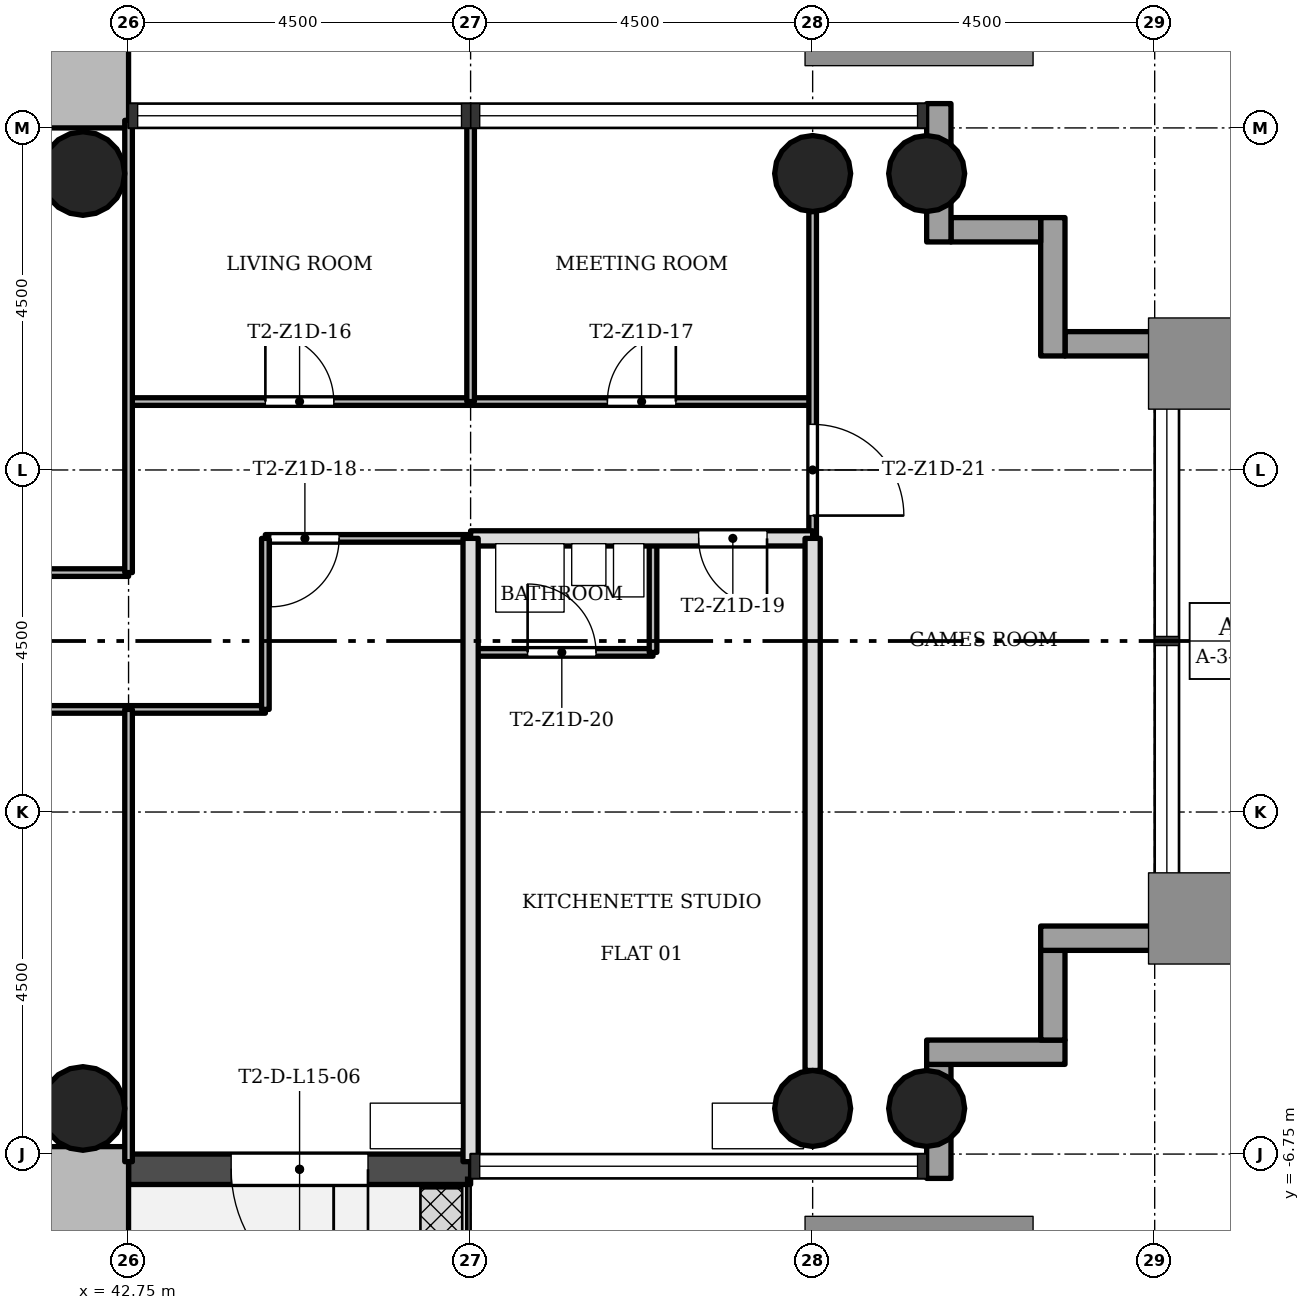
"""IFC4 building model, lengths in metres.
Left out: names, types, materials, properties, quantities, classifications, styles, units other than length and angle.
Written with IfcOpenShell. Run it as: python <this file> out.ifc"""

import sys

from ifc_helpers import new_model, si_unit, direction, frame, frame_2d, origin, origin_2d, place, context, subcontext, project, spatial, rectangle, hollow_circle, extrude, element, fill, save


model = new_model("IFC4")
c1 = context("Model", 3, precision=1e-05, world=origin(), true_north=direction((0.0, 1.0)))
c2 = subcontext(c1, "Body", "Model", "MODEL_VIEW")
j1 = project(units=[si_unit("LENGTHUNIT", "METRE"), si_unit("PLANEANGLEUNIT", "RADIAN")], contexts=[c1])
p1 = place(None, origin())
s1 = spatial("IfcSite", under=j1, at=p1, CompositionType="ELEMENT")
p2 = place(p1, origin())
s2 = spatial("IfcBuilding", under=s1, at=p2, CompositionType="ELEMENT")
p3 = place(p2, frame((0.0, 0.0, 58.5)))
s3 = spatial("IfcBuildingStorey", under=s2, at=p3, CompositionType="ELEMENT", Elevation=58.5)
p4 = place(p3, frame((30.35, 7.3, 0.0), z_axis=(0.0, 0.0, 1.0), x_axis=(1.0, 0.0, 0.0)))
e1 = element("IfcWall", 1, at=p4, inside=s3, PredefinedType="SHEAR", context=c2, shape_type="SweptSolid", body=[
    extrude(rectangle(XDim=12.4, YDim=1.1, at=frame_2d((6.2, 0.0))), origin(), (0.0, 0.0, 1.0), 3.4),
])
p5 = place(p4, frame((4.75, 0.0, 0.0)))
e2 = element("IfcOpeningElement", 2, at=p5, cuts=e1, PredefinedType="OPENING", context=c2, shape_type="SweptSolid", body=[
    extrude(rectangle(XDim=1.8, YDim=2.1, at=frame_2d((0.9, 1.05))), frame((0.0, 0.56, 0.0), z_axis=(0.0, -1.0, 0.0), x_axis=(1.0, 0.0, 0.0)), (0.0, 0.0, 1.0), 1.12),
])
p6 = place(p3, frame((42.2, -15.248, 0.0), z_axis=(0.0, 0.0, 1.0), x_axis=(0.0, 1.0, 0.0)))
e3 = element("IfcWall", 3, at=p6, inside=s3, PredefinedType="SHEAR", context=c2, shape_type="SweptSolid", body=[
    extrude(rectangle(XDim=8.596, YDim=1.1, at=frame_2d((4.298, 0.0))), origin(), (0.0, 0.0, 1.0), 3.4),
])
for number, where, z_axis, x_axis in (
    (4, (51.75, -6.15, 0.0), (0.0, 0.0, 1.0), (1.0, 0.0, 0.0)),
    (5, (51.75, 6.15, 0.0), (0.0, 0.0, 1.0), (1.0, 0.0, 0.0)),
    (6, (53.25, -6.15, 0.0), (0.0, 0.0, 1.0), (1.0, 0.0, 0.0)),
    (7, (53.25, 6.15, 0.0), (0.0, 0.0, 1.0), (1.0, 0.0, 0.0)),
):
    element("IfcColumn", number, at=place(p3, frame(where, z_axis=z_axis, x_axis=x_axis)), inside=s3, PredefinedType="COLUMN", context=c2, shape_type="SweptSolid", body=[
        extrude(hollow_circle(Radius=0.5, WallThickness=0.036, at=origin_2d()), origin(), (0.0, 0.0, 1.0), 3.4),
    ])
for number, where, z_axis, x_axis in (
    (8, (42.15, -6.15, 0.0), (0.0, 0.0, 1.0), (1.0, 0.0, 0.0)),
    (9, (42.15, 6.15, 0.0), (0.0, 0.0, 1.0), (1.0, 0.0, 0.0)),
):
    element("IfcColumn", number, at=place(p3, frame(where, z_axis=z_axis, x_axis=x_axis)), inside=s3, PredefinedType="COLUMN", context=c2, shape_type="SweptSolid", body=[
        extrude(hollow_circle(Radius=0.55, WallThickness=0.04, at=origin_2d()), origin(), (0.0, 0.0, 1.0), 3.4),
    ])
p7 = place(p3, frame((42.75, -6.95, -0.02), z_axis=(0.0, 0.0, 1.0), x_axis=(1.0, 0.0, 0.0)))
e10 = element("IfcWall", 10, at=p7, inside=s3, PredefinedType="STANDARD", context=c2, shape_type="SweptSolid", body=[
    extrude(rectangle(XDim=4.5, YDim=0.4, at=frame_2d((2.25, 0.0))), origin(), (0.0, 0.0, 1.0), 3.12),
])
p8 = place(p7, frame((1.35, 0.0, 0.02)))
e11 = element("IfcOpeningElement", 11, at=p8, cuts=e10, PredefinedType="OPENING", context=c2, shape_type="SweptSolid", body=[
    extrude(rectangle(XDim=1.8, YDim=2.1, at=frame_2d((0.9, 1.05))), frame((0.0, 0.21, 0.0), z_axis=(0.0, -1.0, 0.0), x_axis=(1.0, 0.0, 0.0)), (0.0, 0.0, 1.0), 0.42),
])
p9 = place(p3, frame((53.41, -7.07, -0.3), z_axis=(0.0, 0.0, 1.0), x_axis=(0.0, 1.0, 0.0)))
e12 = element("IfcWall", 12, at=p9, inside=s3, PredefinedType="STANDARD", context=c2, shape_type="SweptSolid", body=[
    extrude(rectangle(XDim=1.5, YDim=0.32, at=frame_2d((0.75, 0.0))), origin(), (0.0, 0.0, 1.0), 3.4),
])
p10 = place(p3, frame((53.25, -5.41, -0.3), z_axis=(0.0, 0.0, 1.0), x_axis=(1.0, 0.0, 0.0)))
e13 = element("IfcWall", 13, at=p10, inside=s3, PredefinedType="STANDARD", context=c2, shape_type="SweptSolid", body=[
    extrude(rectangle(XDim=1.82, YDim=0.32, at=frame_2d((0.91, 0.0))), origin(), (0.0, 0.0, 1.0), 3.4),
])
p11 = place(p3, frame((54.91, -5.25, -0.3), z_axis=(0.0, 0.0, 1.0), x_axis=(0.0, 1.0, 0.0)))
e14 = element("IfcWall", 14, at=p11, inside=s3, PredefinedType="STANDARD", context=c2, shape_type="SweptSolid", body=[
    extrude(rectangle(XDim=1.18, YDim=0.32, at=frame_2d((0.59, 0.0))), origin(), (0.0, 0.0, 1.0), 3.4),
])
p12 = place(p3, frame((54.75, -3.91, -0.3), z_axis=(0.0, 0.0, 1.0), x_axis=(1.0, 0.0, 0.0)))
e15 = element("IfcWall", 15, at=p12, inside=s3, PredefinedType="STANDARD", context=c2, shape_type="SweptSolid", body=[
    extrude(rectangle(XDim=1.82, YDim=0.32, at=frame_2d((0.91, 0.0))), origin(), (0.0, 0.0, 1.0), 3.4),
])
p13 = place(p3, frame((56.57, 3.91, -0.3), z_axis=(0.0, 0.0, 1.0), x_axis=(-1.0, 0.0, 0.0)))
e16 = element("IfcWall", 16, at=p13, inside=s3, PredefinedType="STANDARD", context=c2, shape_type="SweptSolid", body=[
    extrude(rectangle(XDim=1.5, YDim=0.32, at=frame_2d((0.75, 0.0))), origin(), (0.0, 0.0, 1.0), 3.4),
])
p14 = place(p3, frame((54.91, 3.75, -0.3), z_axis=(0.0, 0.0, 1.0), x_axis=(0.0, 1.0, 0.0)))
e17 = element("IfcWall", 17, at=p14, inside=s3, PredefinedType="STANDARD", context=c2, shape_type="SweptSolid", body=[
    extrude(rectangle(XDim=1.82, YDim=0.32, at=frame_2d((0.91, 0.0))), origin(), (0.0, 0.0, 1.0), 3.4),
])
p15 = place(p3, frame((54.75, 5.41, -0.3), z_axis=(0.0, 0.0, 1.0), x_axis=(-1.0, 0.0, 0.0)))
e18 = element("IfcWall", 18, at=p15, inside=s3, PredefinedType="STANDARD", context=c2, shape_type="SweptSolid", body=[
    extrude(rectangle(XDim=1.18, YDim=0.32, at=frame_2d((0.59, 0.0))), origin(), (0.0, 0.0, 1.0), 3.4),
])
p16 = place(p3, frame((53.41, 5.25, -0.3), z_axis=(0.0, 0.0, 1.0), x_axis=(0.0, 1.0, 0.0)))
e19 = element("IfcWall", 19, at=p16, inside=s3, PredefinedType="STANDARD", context=c2, shape_type="SweptSolid", body=[
    extrude(rectangle(XDim=1.82, YDim=0.32, at=frame_2d((0.91, 0.0))), origin(), (0.0, 0.0, 1.0), 3.4),
])
p17 = place(p3, frame((44.55, -0.9, 0.0), z_axis=(0.0, 0.0, 1.0), x_axis=(-1.0, 0.0, 0.0)))
e20 = element("IfcWall", 20, at=p17, inside=s3, PredefinedType="PARTITIONING", context=c2, shape_type="SweptSolid", body=[
    extrude(rectangle(XDim=7.05, YDim=0.1, at=frame_2d((3.525, 0.0))), origin(), (0.0, 0.0, 1.0), 3.0),
])
p18 = place(p17, frame((5.4, 0.0, 0.0)))
e21 = element("IfcOpeningElement", 21, at=p18, cuts=e20, PredefinedType="OPENING", context=c2, shape_type="SweptSolid", body=[
    extrude(rectangle(XDim=0.9, YDim=2.1, at=frame_2d((0.45, 1.05))), frame((0.0, 0.06, 0.0), z_axis=(0.0, -1.0, 0.0), x_axis=(1.0, 0.0, 0.0)), (0.0, 0.0, 1.0), 0.12),
])
p19 = place(p3, frame((49.65, -0.15, 0.0), z_axis=(0.0, 0.0, 1.0), x_axis=(-1.0, 0.0, 0.0)))
e22 = element("IfcWall", 22, at=p19, inside=s3, PredefinedType="PARTITIONING", context=c2, shape_type="SweptSolid", body=[
    extrude(rectangle(XDim=2.4, YDim=0.1, at=frame_2d((1.2, 0.0))), origin(), (0.0, 0.0, 1.0), 3.0),
])
p20 = place(p19, frame((0.75, 0.0, 0.0)))
e23 = element("IfcOpeningElement", 23, at=p20, cuts=e22, PredefinedType="OPENING", context=c2, shape_type="SweptSolid", body=[
    extrude(rectangle(XDim=0.9, YDim=2.1, at=frame_2d((0.45, 1.05))), frame((0.0, 0.06, 0.0), z_axis=(0.0, -1.0, 0.0), x_axis=(1.0, 0.0, 0.0)), (0.0, 0.0, 1.0), 0.12),
])
p21 = place(p3, frame((42.75, 0.9, 0.0), z_axis=(0.0, 0.0, 1.0), x_axis=(-1.0, 0.0, 0.0)))
e24 = element("IfcWall", 24, at=p21, inside=s3, PredefinedType="PARTITIONING", context=c2, shape_type="SweptSolid", body=[
    extrude(rectangle(XDim=5.25, YDim=0.1, at=frame_2d((2.625, 0.0))), origin(), (0.0, 0.0, 1.0), 3.0),
])
p22 = place(p3, frame((47.25, 1.35, 0.0), z_axis=(0.0, 0.0, 1.0), x_axis=(-1.0, 0.0, 0.0)))
e25 = element("IfcWall", 25, at=p22, inside=s3, PredefinedType="PARTITIONING", context=c2, shape_type="SweptSolid", body=[
    extrude(rectangle(XDim=2.7, YDim=0.1, at=frame_2d((1.35, 0.0))), origin(), (0.0, 0.0, 1.0), 3.0),
])
p23 = place(p22, frame((1.73, 0.0, 0.0)))
e26 = element("IfcOpeningElement", 26, at=p23, cuts=e25, PredefinedType="OPENING", context=c2, shape_type="SweptSolid", body=[
    extrude(rectangle(XDim=0.9, YDim=2.1, at=frame_2d((0.45, 1.05))), frame((0.0, 0.06, 0.0), z_axis=(0.0, -1.0, 0.0), x_axis=(1.0, 0.0, 0.0)), (0.0, 0.0, 1.0), 0.12),
])
p24 = place(p3, frame((51.75, 1.35, 0.0), z_axis=(0.0, 0.0, 1.0), x_axis=(-1.0, 0.0, 0.0)))
e27 = element("IfcWall", 27, at=p24, inside=s3, PredefinedType="SOLIDWALL", context=c2, shape_type="SweptSolid", body=[
    extrude(rectangle(XDim=4.5, YDim=0.2, at=frame_2d((2.25, 0.0))), origin(), (0.0, 0.0, 1.0), 3.0),
])
p25 = place(p24, frame((0.6, 0.0, 0.0)))
e28 = element("IfcOpeningElement", 28, at=p25, cuts=e27, PredefinedType="OPENING", context=c2, shape_type="SweptSolid", body=[
    extrude(rectangle(XDim=0.9, YDim=2.1, at=frame_2d((0.45, 1.05))), frame((0.0, 0.11, 0.0), z_axis=(0.0, -1.0, 0.0), x_axis=(1.0, 0.0, 0.0)), (0.0, 0.0, 1.0), 0.22),
])
p26 = place(p3, frame((51.75, 3.15, 0.0), z_axis=(0.0, 0.0, 1.0), x_axis=(-1.0, 0.0, 0.0)))
e29 = element("IfcWall", 29, at=p26, inside=s3, PredefinedType="PARTITIONING", context=c2, shape_type="SweptSolid", body=[
    extrude(rectangle(XDim=9.0, YDim=0.1, at=frame_2d((4.5, 0.0))), origin(), (0.0, 0.0, 1.0), 3.0),
])
p27 = place(p26, frame((6.3, 0.0, 0.0)))
e30 = element("IfcOpeningElement", 30, at=p27, cuts=e29, PredefinedType="OPENING", context=c2, shape_type="SweptSolid", body=[
    extrude(rectangle(XDim=0.9, YDim=2.1, at=frame_2d((0.45, 1.05))), frame((0.0, 0.06, 0.0), z_axis=(0.0, -1.0, 0.0), x_axis=(1.0, 0.0, 0.0)), (0.0, 0.0, 1.0), 0.12),
])
p28 = place(p26, frame((1.8, 0.0, 0.0)))
e31 = element("IfcOpeningElement", 31, at=p28, cuts=e29, PredefinedType="OPENING", context=c2, shape_type="SweptSolid", body=[
    extrude(rectangle(XDim=0.9, YDim=2.1, at=frame_2d((0.45, 1.05))), frame((0.0, 0.06, 0.0), z_axis=(0.0, -1.0, 0.0), x_axis=(1.0, 0.0, 0.0)), (0.0, 0.0, 1.0), 0.12),
])
p29 = place(p3, frame((51.75, 1.35, 0.0), z_axis=(0.0, 0.0, 1.0), x_axis=(0.0, 1.0, 0.0)))
e32 = element("IfcWall", 32, at=p29, inside=s3, PredefinedType="PARTITIONING", context=c2, shape_type="SweptSolid", body=[
    extrude(rectangle(XDim=4.3, YDim=0.1, at=frame_2d((2.15, 0.0))), origin(), (0.0, 0.0, 1.0), 3.0),
])
p30 = place(p29, frame((0.3, 0.0, 0.0)))
e33 = element("IfcOpeningElement", 33, at=p30, cuts=e32, PredefinedType="OPENING", context=c2, shape_type="SweptSolid", body=[
    extrude(rectangle(XDim=1.2, YDim=2.1, at=frame_2d((0.6, 1.05))), frame((0.0, 0.06, 0.0), z_axis=(0.0, -1.0, 0.0), x_axis=(1.0, 0.0, 0.0)), (0.0, 0.0, 1.0), 0.12),
])
p31 = place(p3, frame((51.75, -5.65, 0.0), z_axis=(0.0, 0.0, 1.0), x_axis=(0.0, 1.0, 0.0)))
e34 = element("IfcWall", 34, at=p31, inside=s3, PredefinedType="SOLIDWALL", context=c2, shape_type="SweptSolid", body=[
    extrude(rectangle(XDim=7.0, YDim=0.2, at=frame_2d((3.5, 0.0))), origin(), (0.0, 0.0, 1.0), 3.0),
])
p32 = place(p3, frame((49.65, -0.15, 0.0), z_axis=(0.0, 0.0, 1.0), x_axis=(0.0, 1.0, 0.0)))
e35 = element("IfcWall", 35, at=p32, inside=s3, PredefinedType="PARTITIONING", context=c2, shape_type="SweptSolid", body=[
    extrude(rectangle(XDim=1.5, YDim=0.1, at=frame_2d((0.75, 0.0))), origin(), (0.0, 0.0, 1.0), 3.0),
])
p33 = place(p3, frame((47.25, 3.15, 0.0), z_axis=(0.0, 0.0, 1.0), x_axis=(0.0, 1.0, 0.0)))
e36 = element("IfcWall", 36, at=p33, inside=s3, PredefinedType="PARTITIONING", context=c2, shape_type="SweptSolid", body=[
    extrude(rectangle(XDim=3.7, YDim=0.1, at=frame_2d((1.85, 0.0))), origin(), (0.0, 0.0, 1.0), 3.0),
])
p34 = place(p3, frame((47.25, -6.85, 0.0), z_axis=(0.0, 0.0, 1.0), x_axis=(0.0, 1.0, 0.0)))
e37 = element("IfcWall", 37, at=p34, inside=s3, PredefinedType="SOLIDWALL", context=c2, shape_type="SweptSolid", body=[
    extrude(rectangle(XDim=8.2, YDim=0.2, at=frame_2d((4.1, 0.0))), origin(), (0.0, 0.0, 1.0), 3.0),
])
p35 = place(p3, frame((44.55, -0.9, 0.0), z_axis=(0.0, 0.0, 1.0), x_axis=(0.0, 1.0, 0.0)))
e38 = element("IfcWall", 38, at=p35, inside=s3, PredefinedType="PARTITIONING", context=c2, shape_type="SweptSolid", body=[
    extrude(rectangle(XDim=2.25, YDim=0.1, at=frame_2d((1.125, 0.0))), origin(), (0.0, 0.0, 1.0), 3.0),
])
for number, where, z_axis, x_axis in (
    (39, (42.75, -6.85, 0.0), (0.0, 0.0, 1.0), (0.0, 1.0, 0.0)),
    (40, (42.75, 0.9, 0.0), (0.0, 0.0, 1.0), (0.0, 1.0, 0.0)),
):
    element("IfcWall", number, at=place(p3, frame(where, z_axis=z_axis, x_axis=x_axis)), inside=s3, PredefinedType="PARTITIONING", context=c2, shape_type="SweptSolid", body=[
        extrude(rectangle(XDim=5.95, YDim=0.1, at=frame_2d((2.975, 0.0))), origin(), (0.0, 0.0, 1.0), 3.0),
    ])
p36 = place(p8, origin())
e41 = element("IfcDoor", 41, at=p36, inside=s3, OperationType="SINGLE_SWING_RIGHT", PredefinedType="DOOR", context=c2, shape_type="SweptSolid", body=[
    extrude(rectangle(XDim=1.8, YDim=2.1, at=frame_2d((0.9, 1.05))), frame((0.0, 0.025, 0.0), z_axis=(0.0, -1.0, 0.0), x_axis=(1.0, 0.0, 0.0)), (0.0, 0.0, 1.0), 0.05),
])
fill(e11, e41)
p37 = place(p27, origin())
e42 = element("IfcDoor", 42, at=p37, inside=s3, OperationType="SINGLE_SWING_RIGHT", PredefinedType="DOOR", context=c2, shape_type="SweptSolid", body=[
    extrude(rectangle(XDim=0.9, YDim=2.1, at=frame_2d((0.45, 1.05))), frame((0.0, 0.025, 0.0), z_axis=(0.0, -1.0, 0.0), x_axis=(1.0, 0.0, 0.0)), (0.0, 0.0, 1.0), 0.05),
])
fill(e30, e42)
p38 = place(p28, origin())
e43 = element("IfcDoor", 43, at=p38, inside=s3, OperationType="SINGLE_SWING_LEFT", PredefinedType="DOOR", context=c2, shape_type="SweptSolid", body=[
    extrude(rectangle(XDim=0.9, YDim=2.1, at=frame_2d((0.45, 1.05))), frame((0.0, 0.025, 0.0), z_axis=(0.0, -1.0, 0.0), x_axis=(1.0, 0.0, 0.0)), (0.0, 0.0, 1.0), 0.05),
])
fill(e31, e43)
p39 = place(p23, origin())
e44 = element("IfcDoor", 44, at=p39, inside=s3, OperationType="SINGLE_SWING_LEFT", PredefinedType="DOOR", context=c2, shape_type="SweptSolid", body=[
    extrude(rectangle(XDim=0.9, YDim=2.1, at=frame_2d((0.45, 1.05))), frame((0.0, 0.025, 0.0), z_axis=(0.0, -1.0, 0.0), x_axis=(1.0, 0.0, 0.0)), (0.0, 0.0, 1.0), 0.05),
])
fill(e26, e44)
p40 = place(p25, origin())
e45 = element("IfcDoor", 45, at=p40, inside=s3, OperationType="SINGLE_SWING_RIGHT", PredefinedType="DOOR", context=c2, shape_type="SweptSolid", body=[
    extrude(rectangle(XDim=0.9, YDim=2.1, at=frame_2d((0.45, 1.05))), frame((0.0, 0.025, 0.0), z_axis=(0.0, -1.0, 0.0), x_axis=(1.0, 0.0, 0.0)), (0.0, 0.0, 1.0), 0.05),
])
fill(e28, e45)
p41 = place(p20, origin())
e46 = element("IfcDoor", 46, at=p41, inside=s3, OperationType="SINGLE_SWING_RIGHT", PredefinedType="DOOR", context=c2, shape_type="SweptSolid", body=[
    extrude(rectangle(XDim=0.9, YDim=2.1, at=frame_2d((0.45, 1.05))), frame((0.0, 0.025, 0.0), z_axis=(0.0, -1.0, 0.0), x_axis=(1.0, 0.0, 0.0)), (0.0, 0.0, 1.0), 0.05),
])
fill(e23, e46)
p42 = place(p30, origin())
e47 = element("IfcDoor", 47, at=p42, inside=s3, OperationType="SINGLE_SWING_LEFT", PredefinedType="DOOR", context=c2, shape_type="SweptSolid", body=[
    extrude(rectangle(XDim=1.2, YDim=2.1, at=frame_2d((0.6, 1.05))), frame((0.0, 0.025, 0.0), z_axis=(0.0, -1.0, 0.0), x_axis=(1.0, 0.0, 0.0)), (0.0, 0.0, 1.0), 0.05),
])
fill(e33, e47)
save(model, sys.argv[1])
